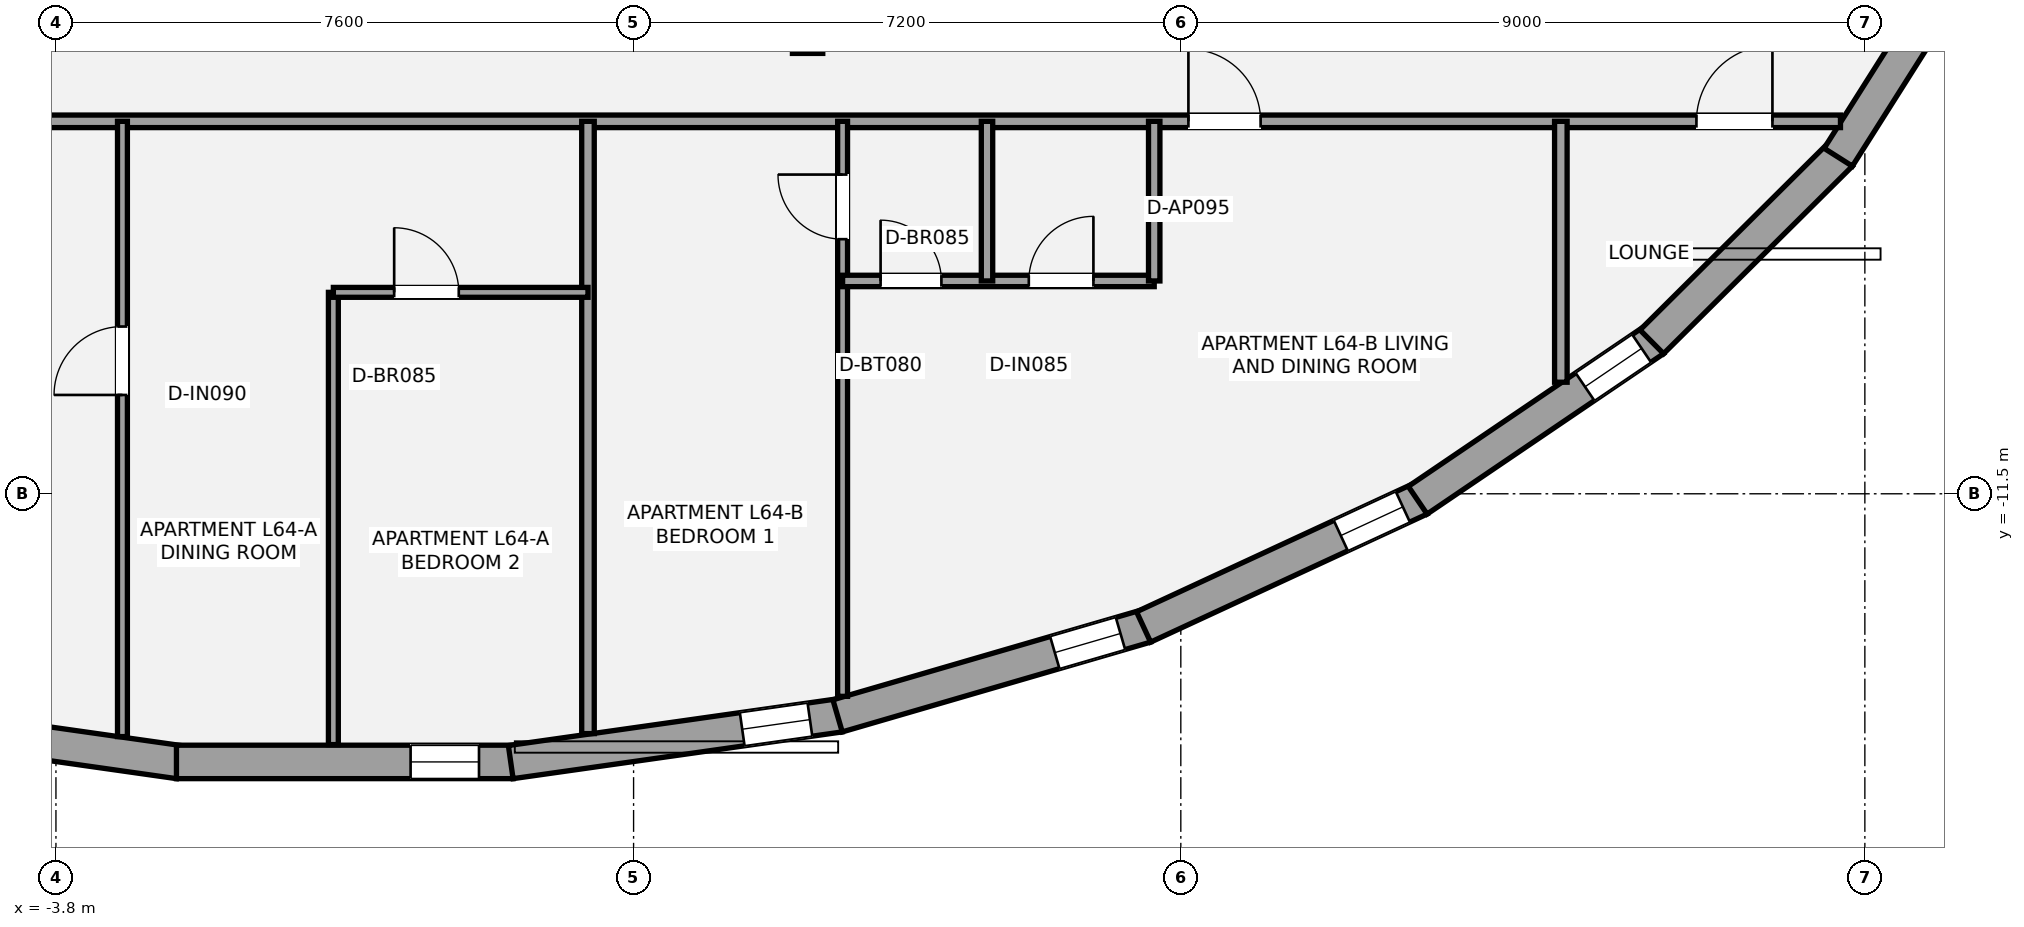
"""IFC4 building model, lengths in metres.
Left out: names, types, materials, properties, quantities, classifications, styles, units other than length and angle.
Written with IfcOpenShell. Run it as: python <this file> out.ifc"""

import sys

from ifc_helpers import new_model, si_unit, direction, frame, frame_2d, origin, origin_2d, place, context, subcontext, project, spatial, rectangle, i_section, extrude, element, fill, save


model = new_model("IFC4")
c1 = context("Model", 3, precision=1e-05, world=origin(), true_north=direction((0.0, 1.0)))
c2 = subcontext(c1, "Body", "Model", "MODEL_VIEW")
j1 = project(units=[si_unit("LENGTHUNIT", "METRE"), si_unit("PLANEANGLEUNIT", "RADIAN")], contexts=[c1])
p1 = place(None, origin())
s1 = spatial("IfcSite", under=j1, at=p1, CompositionType="ELEMENT")
p2 = place(p1, origin())
s2 = spatial("IfcBuilding", under=s1, at=p2, CompositionType="ELEMENT")
p3 = place(p2, frame((0.0, 0.0, 228.9)))
s3 = spatial("IfcBuildingStorey", under=s2, at=p3, CompositionType="ELEMENT", Elevation=228.9)
p4 = place(p3, frame((6.09, -5.513, 0.0), z_axis=(0.0, 0.0, 1.0), x_axis=(1.0, 0.0, 0.0)))
e1 = element("IfcColumn", 1, at=p4, inside=s3, PredefinedType="COLUMN", context=c2, shape_type="SweptSolid", body=[
    extrude(i_section(OverallWidth=0.399, OverallDepth=0.387, WebThickness=0.021, FlangeThickness=0.033, at=origin_2d()), origin(), (0.0, 0.0, 1.0), 3.15),
])
p5 = place(p3, frame((-2.184, -15.03, 0.0), z_axis=(0.0, 0.0, 1.0), x_axis=(-0.990076340622, 0.140530565146, 0.0)))
e2 = element("IfcWall", 2, at=p5, inside=s3, PredefinedType="STANDARD", context=c2, shape_type="SweptSolid", body=[
    extrude(rectangle(XDim=4.375, YDim=0.44, at=frame_2d((2.187, 0.0))), origin(), (0.0, 0.0, 1.0), 2.336),
])
p6 = place(p5, frame((3.027, 0.0, 0.58)))
e3 = element("IfcOpeningElement", 3, at=p6, cuts=e2, PredefinedType="OPENING", context=c2, shape_type="SweptSolid", body=[
    extrude(rectangle(XDim=0.9, YDim=1.35, at=frame_2d((0.45, 0.675))), frame((0.0, 0.23, 0.0), z_axis=(0.0, -1.0, 0.0), x_axis=(1.0, 0.0, 0.0)), (0.0, 0.0, 1.0), 0.46),
])
p7 = place(p3, frame((2.215, -15.028, 0.0), z_axis=(0.0, 0.0, 1.0), x_axis=(-1.0, 0.0, 0.0)))
e4 = element("IfcWall", 4, at=p7, inside=s3, PredefinedType="STANDARD", context=c2, shape_type="SweptSolid", body=[
    extrude(rectangle(XDim=4.429, YDim=0.44, at=frame_2d((2.215, 0.0))), origin(), (0.0, 0.0, 1.0), 2.336),
])
p8 = place(p7, frame((0.448, 0.0, 0.58)))
e5 = element("IfcOpeningElement", 5, at=p8, cuts=e4, PredefinedType="OPENING", context=c2, shape_type="SweptSolid", body=[
    extrude(rectangle(XDim=0.9, YDim=1.35, at=frame_2d((0.45, 0.675))), frame((0.0, 0.23, 0.0), z_axis=(0.0, -1.0, 0.0), x_axis=(1.0, 0.0, 0.0)), (0.0, 0.0, 1.0), 0.46),
])
p9 = place(p3, frame((6.515, -14.415, 0.0), z_axis=(0.0, 0.0, 1.0), x_axis=(-0.990076340622, -0.140530565146, 0.0)))
e6 = element("IfcWall", 6, at=p9, inside=s3, PredefinedType="STANDARD", context=c2, shape_type="SweptSolid", body=[
    extrude(rectangle(XDim=4.375, YDim=0.44, at=frame_2d((2.187, 0.0))), origin(), (0.0, 0.0, 1.0), 2.336),
])
p10 = place(p9, frame((0.398, 0.0, 0.58)))
e7 = element("IfcOpeningElement", 7, at=p10, cuts=e6, PredefinedType="OPENING", context=c2, shape_type="SweptSolid", body=[
    extrude(rectangle(XDim=0.9, YDim=1.35, at=frame_2d((0.45, 0.675))), frame((0.0, 0.23, 0.0), z_axis=(0.0, -1.0, 0.0), x_axis=(1.0, 0.0, 0.0)), (0.0, 0.0, 1.0), 0.46),
])
p11 = place(p3, frame((10.541, -13.24, 0.0), z_axis=(0.0, 0.0, 1.0), x_axis=(-0.960138362531, -0.279525177393, 0.0)))
e8 = element("IfcWall", 8, at=p11, inside=s3, PredefinedType="STANDARD", context=c2, shape_type="SweptSolid", body=[
    extrude(rectangle(XDim=4.226, YDim=0.44, at=frame_2d((2.113, 0.0))), origin(), (0.0, 0.0, 1.0), 2.336),
])
p12 = place(p11, frame((0.349, 0.0, 0.58)))
e9 = element("IfcOpeningElement", 9, at=p12, cuts=e8, PredefinedType="OPENING", context=c2, shape_type="SweptSolid", body=[
    extrude(rectangle(XDim=0.9, YDim=1.35, at=frame_2d((0.45, 0.675))), frame((0.0, 0.23, 0.0), z_axis=(0.0, -1.0, 0.0), x_axis=(1.0, 0.0, 0.0)), (0.0, 0.0, 1.0), 0.46),
])
p13 = place(p3, frame((14.148, -11.567, 0.0), z_axis=(0.0, 0.0, 1.0), x_axis=(-0.907400682183, -0.420266584412, 0.0)))
e10 = element("IfcWall", 10, at=p13, inside=s3, PredefinedType="STANDARD", context=c2, shape_type="SweptSolid", body=[
    extrude(rectangle(XDim=4.009, YDim=0.44, at=frame_2d((2.004, 0.0))), origin(), (0.0, 0.0, 1.0), 2.336),
])
p14 = place(p13, frame((0.249, 0.0, 0.58)))
e11 = element("IfcOpeningElement", 11, at=p14, cuts=e10, PredefinedType="OPENING", context=c2, shape_type="SweptSolid", body=[
    extrude(rectangle(XDim=0.9, YDim=1.35, at=frame_2d((0.45, 0.675))), frame((0.0, 0.23, 0.0), z_axis=(0.0, -1.0, 0.0), x_axis=(1.0, 0.0, 0.0)), (0.0, 0.0, 1.0), 0.46),
])
p15 = place(p3, frame((17.228, -9.475, 0.0), z_axis=(0.0, 0.0, 1.0), x_axis=(-0.827638454008, -0.561261605178, 0.0)))
e12 = element("IfcWall", 12, at=p15, inside=s3, PredefinedType="STANDARD", context=c2, shape_type="SweptSolid", body=[
    extrude(rectangle(XDim=3.76, YDim=0.44, at=frame_2d((1.88, 0.0))), origin(), (0.0, 0.0, 1.0), 2.336),
])
p16 = place(p15, frame((0.2, 0.0, 0.42)))
e13 = element("IfcOpeningElement", 13, at=p16, cuts=e12, PredefinedType="OPENING", context=c2, shape_type="SweptSolid", body=[
    extrude(rectangle(XDim=0.9, YDim=1.35, at=frame_2d((0.45, 0.675))), frame((0.0, 0.23, 0.0), z_axis=(0.0, -1.0, 0.0), x_axis=(1.0, 0.0, 0.0)), (0.0, 0.0, 1.0), 0.46),
])
p17 = place(p3, frame((19.681, -7.034, 0.0), z_axis=(0.0, 0.0, 1.0), x_axis=(-0.709543258305, -0.704661879623, 0.0)))
e14 = element("IfcWall", 14, at=p17, inside=s3, PredefinedType="STANDARD", context=c2, shape_type="SweptSolid", body=[
    extrude(rectangle(XDim=3.501, YDim=0.44, at=frame_2d((1.75, 0.0))), origin(), (0.0, 0.0, 1.0), 2.336),
])
p18 = place(p3, frame((21.392, -4.321, 0.0), z_axis=(0.0, 0.0, 1.0), x_axis=(-0.53485586517, -0.844943313775, 0.0)))
e15 = element("IfcWall", 15, at=p18, inside=s3, PredefinedType="STANDARD", context=c2, shape_type="SweptSolid", body=[
    extrude(rectangle(XDim=3.256, YDim=0.44, at=frame_2d((1.628, 0.0))), origin(), (0.0, 0.0, 1.0), 2.336),
])
p19 = place(p3, frame((-19.679, -6.6, 0.0), z_axis=(0.0, 0.0, 1.0), x_axis=(1.0, 0.0, 0.0)))
e16 = element("IfcWall", 16, at=p19, inside=s3, PredefinedType="PARTITIONING", context=c2, shape_type="SweptSolid", body=[
    extrude(rectangle(XDim=39.358, YDim=0.165, at=frame_2d((19.679, 0.0))), origin(), (0.0, 0.0, 1.0), 2.423),
])
p20 = place(p19, frame((1.121, 0.0, 0.0)))
e17 = element("IfcOpeningElement", 17, at=p20, cuts=e16, PredefinedType="OPENING", context=c2, shape_type="SweptSolid", body=[
    extrude(rectangle(XDim=1.0, YDim=2.15, at=frame_2d((0.5, 1.075))), frame((0.0, 0.093, 0.0), z_axis=(0.0, -1.0, 0.0), x_axis=(1.0, 0.0, 0.0)), (0.0, 0.0, 1.0), 0.185),
])
p21 = place(p19, frame((37.463, 0.0, 0.0)))
e18 = element("IfcOpeningElement", 18, at=p21, cuts=e16, PredefinedType="OPENING", context=c2, shape_type="SweptSolid", body=[
    extrude(rectangle(XDim=1.0, YDim=2.15, at=frame_2d((0.5, 1.075))), frame((0.0, 0.093, 0.0), z_axis=(0.0, -1.0, 0.0), x_axis=(1.0, 0.0, 0.0)), (0.0, 0.0, 1.0), 0.185),
])
p22 = place(p19, frame((13.989, 0.0, 0.0)))
e19 = element("IfcOpeningElement", 19, at=p22, cuts=e16, PredefinedType="OPENING", context=c2, shape_type="SweptSolid", body=[
    extrude(rectangle(XDim=0.95, YDim=2.15, at=frame_2d((0.475, 1.075))), frame((0.0, 0.093, 0.0), z_axis=(0.0, -1.0, 0.0), x_axis=(1.0, 0.0, 0.0)), (0.0, 0.0, 1.0), 0.185),
])
p23 = place(p19, frame((30.779, 0.0, 0.0)))
e20 = element("IfcOpeningElement", 20, at=p23, cuts=e16, PredefinedType="OPENING", context=c2, shape_type="SweptSolid", body=[
    extrude(rectangle(XDim=0.95, YDim=2.15, at=frame_2d((0.475, 1.075))), frame((0.0, 0.093, 0.0), z_axis=(0.0, -1.0, 0.0), x_axis=(1.0, 0.0, 0.0)), (0.0, 0.0, 1.0), 0.185),
])
p24 = place(p3, frame((16.0, -10.032, 0.0), z_axis=(0.0, 0.0, 1.0), x_axis=(0.0, 1.0, 0.0)))
e21 = element("IfcWall", 21, at=p24, inside=s3, PredefinedType="PARTITIONING", context=c2, shape_type="SweptSolid", body=[
    extrude(rectangle(XDim=3.432, YDim=0.165, at=frame_2d((1.716, 0.0))), origin(), (0.0, 0.0, 1.0), 2.423),
])
p25 = place(p3, frame((3.2, -14.655, 0.0), z_axis=(0.0, 0.0, 1.0), x_axis=(0.0, 1.0, 0.0)))
e22 = element("IfcWall", 22, at=p25, inside=s3, PredefinedType="PARTITIONING", context=c2, shape_type="SweptSolid", body=[
    extrude(rectangle(XDim=8.055, YDim=0.165, at=frame_2d((4.028, 0.0))), origin(), (0.0, 0.0, 1.0), 2.423),
])
p26 = place(p3, frame((-0.15, -14.8, 0.0), z_axis=(0.0, 0.0, 1.0), x_axis=(0.0, 1.0, 0.0)))
e23 = element("IfcWall", 23, at=p26, inside=s3, PredefinedType="PARTITIONING", context=c2, shape_type="SweptSolid", body=[
    extrude(rectangle(XDim=5.95, YDim=0.13, at=frame_2d((2.975, 0.0))), origin(), (0.0, 0.0, 1.0), 2.423),
])
p27 = place(p3, frame((-0.15, -8.85, 0.0), z_axis=(0.0, 0.0, 1.0), x_axis=(1.0, 0.0, 0.0)))
e24 = element("IfcWall", 24, at=p27, inside=s3, PredefinedType="PARTITIONING", context=c2, shape_type="SweptSolid", body=[
    extrude(rectangle(XDim=3.35, YDim=0.13, at=frame_2d((1.675, 0.0))), origin(), (0.0, 0.0, 1.0), 2.97),
])
p28 = place(p27, frame((0.8, 0.0, 0.0)))
e25 = element("IfcOpeningElement", 25, at=p28, cuts=e24, PredefinedType="OPENING", context=c2, shape_type="SweptSolid", body=[
    extrude(rectangle(XDim=0.85, YDim=2.1, at=frame_2d((0.425, 1.05))), frame((0.0, 0.075, 0.0), z_axis=(0.0, -1.0, 0.0), x_axis=(1.0, 0.0, 0.0)), (0.0, 0.0, 1.0), 0.15),
])
p29 = place(p3, frame((-2.925, -14.694, 0.0), z_axis=(0.0, 0.0, 1.0), x_axis=(0.0, 1.0, 0.0)))
e26 = element("IfcWall", 26, at=p29, inside=s3, PredefinedType="PARTITIONING", context=c2, shape_type="SweptSolid", body=[
    extrude(rectangle(XDim=8.094, YDim=0.13, at=frame_2d((4.047, 0.0))), origin(), (0.0, 0.0, 1.0), 2.423),
])
p30 = place(p29, frame((4.495, 0.0, 0.0)))
e27 = element("IfcOpeningElement", 27, at=p30, cuts=e26, PredefinedType="OPENING", context=c2, shape_type="SweptSolid", body=[
    extrude(rectangle(XDim=0.9, YDim=2.1, at=frame_2d((0.45, 1.05))), frame((0.0, 0.075, 0.0), z_axis=(0.0, -1.0, 0.0), x_axis=(1.0, 0.0, 0.0)), (0.0, 0.0, 1.0), 0.15),
])
p31 = place(p3, frame((6.55, -14.165, 0.0), z_axis=(0.0, 0.0, 1.0), x_axis=(0.0, 1.0, 0.0)))
e28 = element("IfcWall", 28, at=p31, inside=s3, PredefinedType="PARTITIONING", context=c2, shape_type="SweptSolid", body=[
    extrude(rectangle(XDim=7.565, YDim=0.13, at=frame_2d((3.782, 0.0))), origin(), (0.0, 0.0, 1.0), 2.97),
])
p32 = place(p31, frame((6.015, 0.0, 0.0)))
e29 = element("IfcOpeningElement", 29, at=p32, cuts=e28, PredefinedType="OPENING", context=c2, shape_type="SweptSolid", body=[
    extrude(rectangle(XDim=0.85, YDim=2.1, at=frame_2d((0.425, 1.05))), frame((0.0, 0.075, 0.0), z_axis=(0.0, -1.0, 0.0), x_axis=(1.0, 0.0, 0.0)), (0.0, 0.0, 1.0), 0.15),
])
p33 = place(p3, frame((6.55, -8.7, 0.0), z_axis=(0.0, 0.0, 1.0), x_axis=(1.0, 0.0, 0.0)))
e30 = element("IfcWall", 30, at=p33, inside=s3, PredefinedType="PLUMBINGWALL", context=c2, shape_type="SweptSolid", body=[
    extrude(rectangle(XDim=4.1, YDim=0.15, at=frame_2d((2.05, 0.0))), origin(), (0.0, 0.0, 1.0), 2.423),
])
p34 = place(p33, frame((0.5, 0.0, 0.0)))
e31 = element("IfcOpeningElement", 31, at=p34, cuts=e30, PredefinedType="OPENING", context=c2, shape_type="SweptSolid", body=[
    extrude(rectangle(XDim=0.8, YDim=2.1, at=frame_2d((0.4, 1.05))), frame((0.0, 0.085, 0.0), z_axis=(0.0, -1.0, 0.0), x_axis=(1.0, 0.0, 0.0)), (0.0, 0.0, 1.0), 0.17),
])
p35 = place(p33, frame((2.45, 0.0, 0.0)))
e32 = element("IfcOpeningElement", 32, at=p35, cuts=e30, PredefinedType="OPENING", context=c2, shape_type="SweptSolid", body=[
    extrude(rectangle(XDim=0.85, YDim=2.1, at=frame_2d((0.425, 1.05))), frame((0.0, 0.085, 0.0), z_axis=(0.0, -1.0, 0.0), x_axis=(1.0, 0.0, 0.0)), (0.0, 0.0, 1.0), 0.17),
])
for number, where, z_axis, x_axis in (
    (33, (8.45, -8.7, 0.0), (0.0, 0.0, 1.0), (0.0, 1.0, 0.0)),
    (34, (10.65, -8.7, 0.0), (0.0, 0.0, 1.0), (0.0, 1.0, 0.0)),
):
    element("IfcWall", number, at=place(p3, frame(where, z_axis=z_axis, x_axis=x_axis)), inside=s3, PredefinedType="PLUMBINGWALL", context=c2, shape_type="SweptSolid", body=[
        extrude(rectangle(XDim=2.1, YDim=0.15, at=frame_2d((1.05, 0.0))), origin(), (0.0, 0.0, 1.0), 2.97),
    ])
p36 = place(p8, origin())
e35 = element("IfcWindow", 35, at=p36, inside=s3, PartitioningType="SINGLE_PANEL", PredefinedType="WINDOW", context=c2, shape_type="SweptSolid", body=[
    extrude(rectangle(XDim=0.9, YDim=1.35, at=frame_2d((0.45, 0.675))), frame((0.0, -0.01, 0.0), z_axis=(0.0, -1.0, 0.0), x_axis=(1.0, 0.0, 0.0)), (0.0, 0.0, 1.0), 0.06),
])
fill(e5, e35)
p37 = place(p10, origin())
e36 = element("IfcWindow", 36, at=p37, inside=s3, PartitioningType="SINGLE_PANEL", PredefinedType="WINDOW", context=c2, shape_type="SweptSolid", body=[
    extrude(rectangle(XDim=0.9, YDim=1.35, at=frame_2d((0.45, 0.675))), frame((0.0, -0.01, 0.0), z_axis=(0.0, -1.0, 0.0), x_axis=(1.0, 0.0, 0.0)), (0.0, 0.0, 1.0), 0.06),
])
fill(e7, e36)
p38 = place(p12, origin())
e37 = element("IfcWindow", 37, at=p38, inside=s3, PartitioningType="SINGLE_PANEL", PredefinedType="WINDOW", context=c2, shape_type="SweptSolid", body=[
    extrude(rectangle(XDim=0.9, YDim=1.35, at=frame_2d((0.45, 0.675))), frame((0.0, -0.01, 0.0), z_axis=(0.0, -1.0, 0.0), x_axis=(1.0, 0.0, 0.0)), (0.0, 0.0, 1.0), 0.06),
])
fill(e9, e37)
p39 = place(p14, origin())
e38 = element("IfcWindow", 38, at=p39, inside=s3, PartitioningType="SINGLE_PANEL", PredefinedType="WINDOW", context=c2, shape_type="SweptSolid", body=[
    extrude(rectangle(XDim=0.9, YDim=1.35, at=frame_2d((0.45, 0.675))), frame((0.0, -0.01, 0.0), z_axis=(0.0, -1.0, 0.0), x_axis=(1.0, 0.0, 0.0)), (0.0, 0.0, 1.0), 0.06),
])
fill(e11, e38)
p40 = place(p16, origin())
e39 = element("IfcWindow", 39, at=p40, inside=s3, PartitioningType="SINGLE_PANEL", PredefinedType="WINDOW", context=c2, shape_type="SweptSolid", body=[
    extrude(rectangle(XDim=0.9, YDim=1.35, at=frame_2d((0.45, 0.675))), frame((0.0, -0.01, 0.0), z_axis=(0.0, -1.0, 0.0), x_axis=(1.0, 0.0, 0.0)), (0.0, 0.0, 1.0), 0.06),
])
fill(e13, e39)
p41 = place(p21, origin())
e40 = element("IfcDoor", 40, at=p41, inside=s3, OperationType="SINGLE_SWING_RIGHT", PredefinedType="DOOR", context=c2, shape_type="SweptSolid", body=[
    extrude(rectangle(XDim=1.0, YDim=2.15, at=frame_2d((0.5, 1.075))), frame((0.0, 0.025, 0.0), z_axis=(0.0, -1.0, 0.0), x_axis=(1.0, 0.0, 0.0)), (0.0, 0.0, 1.0), 0.05),
])
fill(e18, e40)
p42 = place(p28, origin())
e41 = element("IfcDoor", 41, at=p42, inside=s3, OperationType="SINGLE_SWING_LEFT", PredefinedType="DOOR", context=c2, shape_type="SweptSolid", body=[
    extrude(rectangle(XDim=0.85, YDim=2.1, at=frame_2d((0.425, 1.05))), frame((0.0, 0.025, 0.0), z_axis=(0.0, -1.0, 0.0), x_axis=(1.0, 0.0, 0.0)), (0.0, 0.0, 1.0), 0.05),
])
fill(e25, e41)
p43 = place(p30, origin())
e42 = element("IfcDoor", 42, at=p43, inside=s3, OperationType="SINGLE_SWING_LEFT", PredefinedType="DOOR", context=c2, shape_type="SweptSolid", body=[
    extrude(rectangle(XDim=0.9, YDim=2.1, at=frame_2d((0.45, 1.05))), frame((0.0, 0.025, 0.0), z_axis=(0.0, -1.0, 0.0), x_axis=(1.0, 0.0, 0.0)), (0.0, 0.0, 1.0), 0.05),
])
fill(e27, e42)
p44 = place(p32, origin())
e43 = element("IfcDoor", 43, at=p44, inside=s3, OperationType="SINGLE_SWING_RIGHT", PredefinedType="DOOR", context=c2, shape_type="SweptSolid", body=[
    extrude(rectangle(XDim=0.85, YDim=2.1, at=frame_2d((0.425, 1.05))), frame((0.0, 0.025, 0.0), z_axis=(0.0, -1.0, 0.0), x_axis=(1.0, 0.0, 0.0)), (0.0, 0.0, 1.0), 0.05),
])
fill(e29, e43)
p45 = place(p34, origin())
e44 = element("IfcDoor", 44, at=p45, inside=s3, OperationType="SINGLE_SWING_LEFT", PredefinedType="DOOR", context=c2, shape_type="SweptSolid", body=[
    extrude(rectangle(XDim=0.8, YDim=2.1, at=frame_2d((0.4, 1.05))), frame((0.0, 0.025, 0.0), z_axis=(0.0, -1.0, 0.0), x_axis=(1.0, 0.0, 0.0)), (0.0, 0.0, 1.0), 0.05),
])
fill(e31, e44)
p46 = place(p35, origin())
e45 = element("IfcDoor", 45, at=p46, inside=s3, OperationType="SINGLE_SWING_RIGHT", PredefinedType="DOOR", context=c2, shape_type="SweptSolid", body=[
    extrude(rectangle(XDim=0.85, YDim=2.1, at=frame_2d((0.425, 1.05))), frame((0.0, 0.025, 0.0), z_axis=(0.0, -1.0, 0.0), x_axis=(1.0, 0.0, 0.0)), (0.0, 0.0, 1.0), 0.05),
])
fill(e32, e45)
p47 = place(p23, origin())
e46 = element("IfcDoor", 46, at=p47, inside=s3, OperationType="SINGLE_SWING_LEFT", PredefinedType="DOOR", context=c2, shape_type="SweptSolid", body=[
    extrude(rectangle(XDim=0.95, YDim=2.15, at=frame_2d((0.475, 1.075))), frame((0.0, 0.025, 0.0), z_axis=(0.0, -1.0, 0.0), x_axis=(1.0, 0.0, 0.0)), (0.0, 0.0, 1.0), 0.05),
])
fill(e20, e46)
save(model, sys.argv[1])
